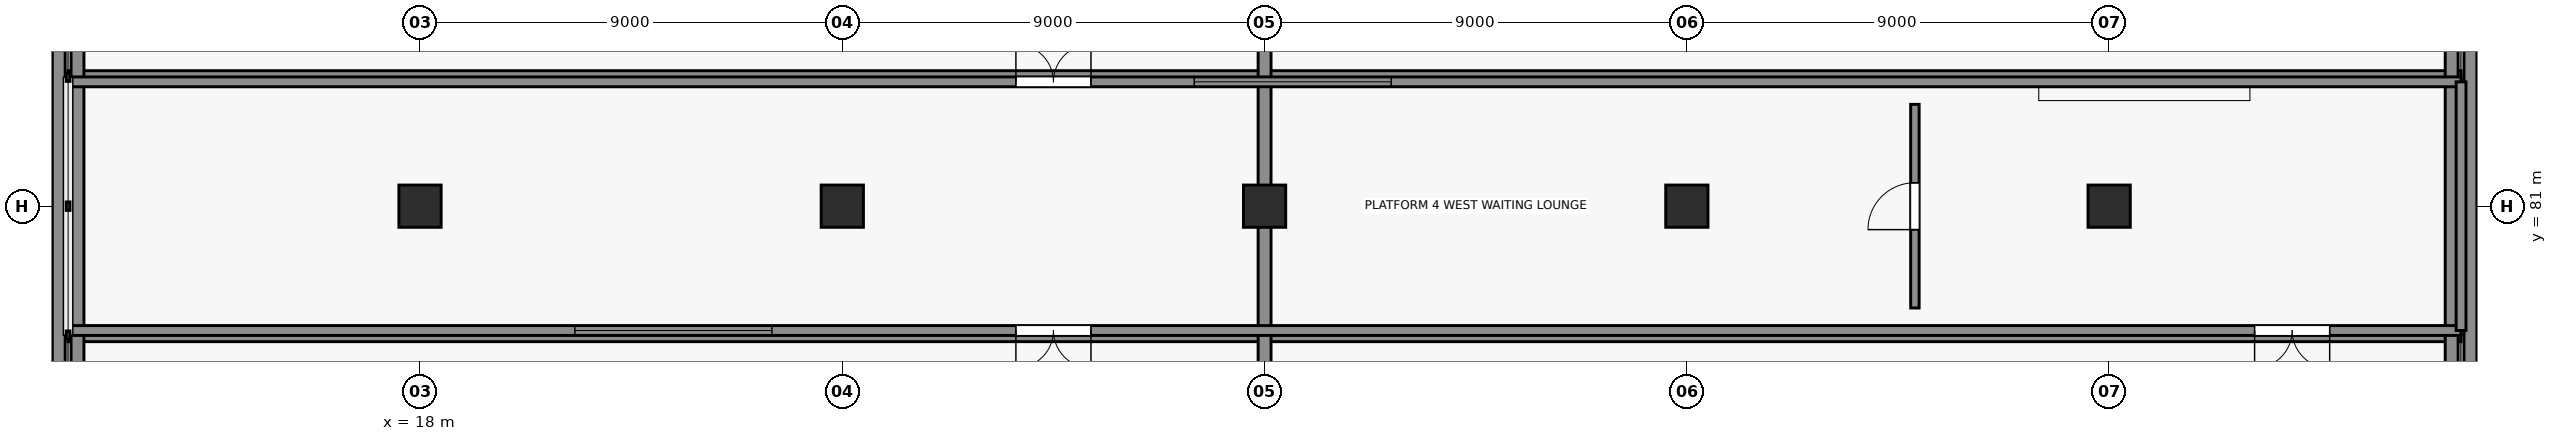
"""IFC4 building model, lengths in metres.
Left out: names, types, materials, properties, quantities, classifications, styles, units other than length and angle.
Written with IfcOpenShell. Run it as: python <this file> out.ifc"""

import sys

from ifc_helpers import new_model, si_unit, direction, frame, frame_2d, origin, origin_2d, place, context, subcontext, project, spatial, rectangle, extrude, element, fill, save


model = new_model("IFC4")
c1 = context("Model", 3, precision=1e-05, world=origin(), true_north=direction((0.0, 1.0)))
c2 = subcontext(c1, "Body", "Model", "MODEL_VIEW")
j1 = project(units=[si_unit("LENGTHUNIT", "METRE"), si_unit("PLANEANGLEUNIT", "RADIAN")], contexts=[c1])
p1 = place(None, origin())
s1 = spatial("IfcSite", under=j1, at=p1, CompositionType="ELEMENT")
p2 = place(p1, origin())
s2 = spatial("IfcBuilding", under=s1, at=p2, CompositionType="ELEMENT")
p3 = place(p2, origin())
s3 = spatial("IfcBuildingStorey", under=s2, at=p3, CompositionType="ELEMENT", Elevation=0.0)
for number, where, z_axis, x_axis in (
    (1, (10.5, 78.25, 0.0), (0.0, 0.0, 1.0), (1.0, 0.0, 0.0)),
    (2, (10.5, 83.75, 0.0), (0.0, 0.0, 1.0), (1.0, 0.0, 0.0)),
):
    element("IfcWall", number, at=place(p3, frame(where, z_axis=z_axis, x_axis=x_axis)), inside=s3, PredefinedType="SOLIDWALL", context=c2, shape_type="SweptSolid", body=[
        extrude(rectangle(XDim=51.0, YDim=0.275, at=frame_2d((25.5, 0.0))), origin(), (0.0, 0.0, 1.0), 0.675),
    ])
for number, where, z_axis, x_axis in (
    (3, (10.3, 77.25, 0.0), (0.0, 0.0, 1.0), (0.0, 1.0, 0.0)),
    (4, (10.7, 77.25, 0.0), (0.0, 0.0, 1.0), (0.0, 1.0, 0.0)),
    (5, (36.0, 77.25, 0.0), (0.0, 0.0, 1.0), (0.0, 1.0, 0.0)),
    (6, (61.3, 77.25, 0.0), (0.0, 0.0, 1.0), (0.0, 1.0, 0.0)),
    (7, (61.7, 77.25, 0.0), (0.0, 0.0, 1.0), (0.0, 1.0, 0.0)),
):
    element("IfcWall", number, at=place(p3, frame(where, z_axis=z_axis, x_axis=x_axis)), inside=s3, PredefinedType="SOLIDWALL", context=c2, shape_type="SweptSolid", body=[
        extrude(rectangle(XDim=7.5, YDim=0.275, at=frame_2d((3.75, 0.0))), origin(), (0.0, 0.0, 1.0), 0.675),
    ])
for number, where, z_axis, x_axis in (
    (8, (18.0, 81.0, 0.0), (0.0, 0.0, 1.0), (1.0, 0.0, 0.0)),
    (9, (27.0, 81.0, 0.0), (0.0, 0.0, 1.0), (1.0, 0.0, 0.0)),
    (10, (36.0, 81.0, 0.0), (0.0, 0.0, 1.0), (1.0, 0.0, 0.0)),
    (11, (45.0, 81.0, 0.0), (0.0, 0.0, 1.0), (1.0, 0.0, 0.0)),
    (12, (54.0, 81.0, 0.0), (0.0, 0.0, 1.0), (1.0, 0.0, 0.0)),
):
    element("IfcColumn", number, at=place(p3, frame(where, z_axis=z_axis, x_axis=x_axis)), inside=s3, PredefinedType="COLUMN", context=c2, shape_type="SweptSolid", body=[
        extrude(rectangle(XDim=0.9, YDim=0.9, at=origin_2d()), origin(), (0.0, 0.0, 1.0), 4.8),
    ])
p4 = place(p3, frame((61.5, 78.35, 0.915), z_axis=(0.0, 0.0, 1.0), x_axis=(-1.0, 0.0, 0.0)))
e13 = element("IfcWall", 13, at=p4, inside=s3, PredefinedType="SOLIDWALL", context=c2, shape_type="SweptSolid", body=[
    extrude(rectangle(XDim=51.0, YDim=0.21, at=frame_2d((25.5, 0.0))), origin(), (0.0, 0.0, 1.0), 3.185),
])
p5 = place(p4, frame((29.2, 0.0, 0.0)))
e14 = element("IfcOpeningElement", 14, at=p5, cuts=e13, PredefinedType="OPENING", context=c2, shape_type="SweptSolid", body=[
    extrude(rectangle(XDim=1.6, YDim=2.3, at=frame_2d((0.8, 1.15))), frame((0.0, 0.115, 0.0), z_axis=(0.0, -1.0, 0.0), x_axis=(1.0, 0.0, 0.0)), (0.0, 0.0, 1.0), 0.23),
])
p6 = place(p4, frame((2.8, 0.0, 0.0)))
e15 = element("IfcOpeningElement", 15, at=p6, cuts=e13, PredefinedType="OPENING", context=c2, shape_type="SweptSolid", body=[
    extrude(rectangle(XDim=1.6, YDim=2.3, at=frame_2d((0.8, 1.15))), frame((0.0, 0.115, 0.0), z_axis=(0.0, -1.0, 0.0), x_axis=(1.0, 0.0, 0.0)), (0.0, 0.0, 1.0), 0.23),
])
p7 = place(p4, frame((36.0, 0.0, 0.9)))
e16 = element("IfcOpeningElement", 16, at=p7, cuts=e13, PredefinedType="OPENING", context=c2, shape_type="SweptSolid", body=[
    extrude(rectangle(XDim=4.2, YDim=1.5, at=frame_2d((2.1, 0.75))), frame((0.0, 0.115, 0.0), z_axis=(0.0, -1.0, 0.0), x_axis=(1.0, 0.0, 0.0)), (0.0, 0.0, 1.0), 0.23),
])
p8 = place(p3, frame((10.5, 83.65, 0.915), z_axis=(0.0, 0.0, 1.0), x_axis=(1.0, 0.0, 0.0)))
e17 = element("IfcWall", 17, at=p8, inside=s3, PredefinedType="SOLIDWALL", context=c2, shape_type="SweptSolid", body=[
    extrude(rectangle(XDim=51.0, YDim=0.21, at=frame_2d((25.5, 0.0))), origin(), (0.0, 0.0, 1.0), 3.185),
])
p9 = place(p8, frame((20.2, 0.0, 0.0)))
e18 = element("IfcOpeningElement", 18, at=p9, cuts=e17, PredefinedType="OPENING", context=c2, shape_type="SweptSolid", body=[
    extrude(rectangle(XDim=1.6, YDim=2.3, at=frame_2d((0.8, 1.15))), frame((0.0, 0.115, 0.0), z_axis=(0.0, -1.0, 0.0), x_axis=(1.0, 0.0, 0.0)), (0.0, 0.0, 1.0), 0.23),
])
p10 = place(p8, frame((24.0, 0.0, 0.9)))
e19 = element("IfcOpeningElement", 19, at=p10, cuts=e17, PredefinedType="OPENING", context=c2, shape_type="SweptSolid", body=[
    extrude(rectangle(XDim=4.2, YDim=1.5, at=frame_2d((2.1, 0.75))), frame((0.0, 0.115, 0.0), z_axis=(0.0, -1.0, 0.0), x_axis=(1.0, 0.0, 0.0)), (0.0, 0.0, 1.0), 0.23),
])
p11 = place(p3, frame((61.5, 83.65, 0.915), z_axis=(0.0, 0.0, 1.0), x_axis=(0.0, -1.0, 0.0)))
e20 = element("IfcWall", 20, at=p11, inside=s3, PredefinedType="SOLIDWALL", context=c2, shape_type="SweptSolid", body=[
    extrude(rectangle(XDim=5.3, YDim=0.21, at=frame_2d((2.65, 0.0))), origin(), (0.0, 0.0, 1.0), 3.185),
])
p12 = place(p3, frame((49.86, 78.83, 0.915), z_axis=(0.0, 0.0, 1.0), x_axis=(0.0, 1.0, 0.0)))
e21 = element("IfcWall", 21, at=p12, inside=s3, PredefinedType="PARTITIONING", context=c2, shape_type="SweptSolid", body=[
    extrude(rectangle(XDim=4.34, YDim=0.18, at=frame_2d((2.17, 0.0))), origin(), (0.0, 0.0, 1.0), 3.435),
])
p13 = place(p12, frame((1.67, 0.0, 0.0)))
e22 = element("IfcOpeningElement", 22, at=p13, cuts=e21, PredefinedType="OPENING", context=c2, shape_type="SweptSolid", body=[
    extrude(rectangle(XDim=1.0, YDim=2.15, at=frame_2d((0.5, 1.075))), frame((0.0, 0.1, 0.0), z_axis=(0.0, -1.0, 0.0), x_axis=(1.0, 0.0, 0.0)), (0.0, 0.0, 1.0), 0.2),
])
p14 = place(p5, origin())
e23 = element("IfcDoor", 23, at=p14, inside=s3, OperationType="DOUBLE_DOOR_SINGLE_SWING", PredefinedType="DOOR", context=c2, shape_type="SweptSolid", body=[
    extrude(rectangle(XDim=1.6, YDim=2.3, at=frame_2d((0.8, 1.15))), frame((0.0, 0.025, 0.0), z_axis=(0.0, -1.0, 0.0), x_axis=(1.0, 0.0, 0.0)), (0.0, 0.0, 1.0), 0.05),
])
fill(e14, e23)
p15 = place(p6, origin())
e24 = element("IfcDoor", 24, at=p15, inside=s3, OperationType="DOUBLE_DOOR_SINGLE_SWING", PredefinedType="DOOR", context=c2, shape_type="SweptSolid", body=[
    extrude(rectangle(XDim=1.6, YDim=2.3, at=frame_2d((0.8, 1.15))), frame((0.0, 0.025, 0.0), z_axis=(0.0, -1.0, 0.0), x_axis=(1.0, 0.0, 0.0)), (0.0, 0.0, 1.0), 0.05),
])
fill(e15, e24)
p16 = place(p9, origin())
e25 = element("IfcDoor", 25, at=p16, inside=s3, OperationType="DOUBLE_DOOR_SINGLE_SWING", PredefinedType="DOOR", context=c2, shape_type="SweptSolid", body=[
    extrude(rectangle(XDim=1.6, YDim=2.3, at=frame_2d((0.8, 1.15))), frame((0.0, 0.025, 0.0), z_axis=(0.0, -1.0, 0.0), x_axis=(1.0, 0.0, 0.0)), (0.0, 0.0, 1.0), 0.05),
])
fill(e18, e25)
p17 = place(p7, origin())
e26 = element("IfcWindow", 26, at=p17, inside=s3, PartitioningType="SINGLE_PANEL", PredefinedType="WINDOW", context=c2, shape_type="SweptSolid", body=[
    extrude(rectangle(XDim=4.2, YDim=1.5, at=frame_2d((2.1, 0.75))), frame((0.0, 0.03, 0.0), z_axis=(0.0, -1.0, 0.0), x_axis=(1.0, 0.0, 0.0)), (0.0, 0.0, 1.0), 0.06),
])
fill(e16, e26)
p18 = place(p10, origin())
e27 = element("IfcWindow", 27, at=p18, inside=s3, PartitioningType="SINGLE_PANEL", PredefinedType="WINDOW", context=c2, shape_type="SweptSolid", body=[
    extrude(rectangle(XDim=4.2, YDim=1.5, at=frame_2d((2.1, 0.75))), frame((0.0, 0.03, 0.0), z_axis=(0.0, -1.0, 0.0), x_axis=(1.0, 0.0, 0.0)), (0.0, 0.0, 1.0), 0.06),
])
fill(e19, e27)
p19 = place(p13, origin())
e28 = element("IfcDoor", 28, at=p19, inside=s3, OperationType="SINGLE_SWING_LEFT", PredefinedType="DOOR", context=c2, shape_type="SweptSolid", body=[
    extrude(rectangle(XDim=1.0, YDim=2.15, at=frame_2d((0.5, 1.075))), frame((0.0, 0.025, 0.0), z_axis=(0.0, -1.0, 0.0), x_axis=(1.0, 0.0, 0.0)), (0.0, 0.0, 1.0), 0.05),
])
fill(e22, e28)
save(model, sys.argv[1])
